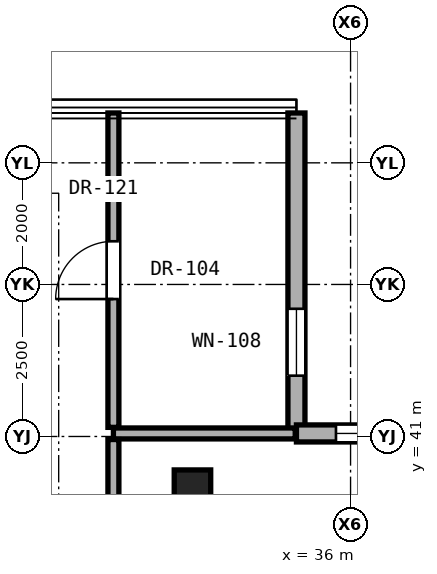
"""IFC4 building model, lengths in metres.
Left out: names, types, materials, properties, quantities, classifications, styles, units other than length and angle.
Written with IfcOpenShell. Run it as: python <this file> out.ifc"""

import sys

from ifc_helpers import new_model, si_unit, direction, frame, frame_2d, origin, origin_2d, place, context, subcontext, project, spatial, rectangle, extrude, element, fill, save


model = new_model("IFC4")
c1 = context("Model", 3, precision=1e-05, world=origin(), true_north=direction((0.0, 1.0)))
c2 = subcontext(c1, "Body", "Model", "MODEL_VIEW")
j1 = project(units=[si_unit("LENGTHUNIT", "METRE"), si_unit("PLANEANGLEUNIT", "RADIAN")], contexts=[c1])
p1 = place(None, origin())
s1 = spatial("IfcSite", under=j1, at=p1, CompositionType="ELEMENT")
p2 = place(p1, origin())
s2 = spatial("IfcBuilding", under=s1, at=p2, CompositionType="ELEMENT")
p3 = place(p2, frame((0.0, 0.0, 118.1)))
s3 = spatial("IfcBuildingStorey", under=s2, at=p3, CompositionType="ELEMENT", Elevation=118.1)
p4 = place(p3, frame((33.4, 40.0, 0.0), z_axis=(0.0, 0.0, 1.0), x_axis=(1.0, 0.0, 0.0)))
e1 = element("IfcColumn", 1, at=p4, inside=s3, PredefinedType="PILASTER", context=c2, shape_type="SweptSolid", body=[
    extrude(rectangle(XDim=0.6, YDim=0.9, at=origin_2d()), origin(), (0.0, 0.0, 1.0), 3.3),
])
p5 = place(p3, frame((35.11, 41.05, 0.0), z_axis=(0.0, 0.0, 1.0), x_axis=(0.0, 1.0, 0.0)))
e2 = element("IfcWall", 2, at=p5, inside=s3, PredefinedType="SOLIDWALL", context=c2, shape_type="SweptSolid", body=[
    extrude(rectangle(XDim=5.27, YDim=0.28, at=frame_2d((2.635, 0.0))), origin(), (0.0, 0.0, 1.0), 3.06),
])
p6 = place(p5, frame((0.95, 0.0, 0.85)))
e3 = element("IfcOpeningElement", 3, at=p6, cuts=e2, PredefinedType="OPENING", context=c2, shape_type="SweptSolid", body=[
    extrude(rectangle(XDim=1.1, YDim=2.0, at=frame_2d((0.55, 1.0))), frame((0.0, 0.15, 0.0), z_axis=(0.0, -1.0, 0.0), x_axis=(1.0, 0.0, 0.0)), (0.0, 0.0, 1.0), 0.3),
])
p7 = place(p3, frame((40.38, 41.05, 0.0), z_axis=(0.0, 0.0, 1.0), x_axis=(-1.0, 0.0, 0.0)))
e4 = element("IfcWall", 4, at=p7, inside=s3, PredefinedType="SOLIDWALL", context=c2, shape_type="SweptSolid", body=[
    extrude(rectangle(XDim=5.27, YDim=0.28, at=frame_2d((2.635, 0.0))), origin(), (0.0, 0.0, 1.0), 3.06),
])
p8 = place(p7, frame((3.52, 0.0, 0.85)))
e5 = element("IfcOpeningElement", 5, at=p8, cuts=e4, PredefinedType="OPENING", context=c2, shape_type="SweptSolid", body=[
    extrude(rectangle(XDim=1.1, YDim=2.0, at=frame_2d((0.55, 1.0))), frame((0.0, 0.15, 0.0), z_axis=(0.0, -1.0, 0.0), x_axis=(1.0, 0.0, 0.0)), (0.0, 0.0, 1.0), 0.3),
])
p9 = place(p3, frame((32.1, 41.05, 0.0), z_axis=(0.0, 0.0, 1.0), x_axis=(1.0, 0.0, 0.0)))
e6 = element("IfcWall", 6, at=p9, inside=s3, PredefinedType="PARTITIONING", context=c2, shape_type="SweptSolid", body=[
    extrude(rectangle(XDim=2.99, YDim=0.18, at=frame_2d((1.495, 0.0))), origin(), (0.0, 0.0, 1.0), 3.08),
])
p10 = place(p3, frame((32.1, 29.752, 0.0), z_axis=(0.0, 0.0, 1.0), x_axis=(0.0, 1.0, 0.0)))
e7 = element("IfcWall", 7, at=p10, inside=s3, PredefinedType="PARTITIONING", context=c2, shape_type="SweptSolid", body=[
    extrude(rectangle(XDim=11.198, YDim=0.18, at=frame_2d((5.599, 0.0))), origin(), (0.0, 0.0, 1.0), 2.299),
])
p11 = place(p10, frame((5.074, 0.0, 0.0)))
e8 = element("IfcOpeningElement", 8, at=p11, cuts=e7, PredefinedType="OPENING", context=c2, shape_type="SweptSolid", body=[
    extrude(rectangle(XDim=1.05, YDim=2.2, at=frame_2d((0.525, 1.1))), frame((0.0, 0.1, 0.0), z_axis=(0.0, -1.0, 0.0), x_axis=(1.0, 0.0, 0.0)), (0.0, 0.0, 1.0), 0.2),
])
p12 = place(p3, frame((32.1, 41.15, 0.0), z_axis=(0.0, 0.0, 1.0), x_axis=(0.0, 1.0, 0.0)))
e9 = element("IfcWall", 9, at=p12, inside=s3, PredefinedType="PARTITIONING", context=c2, shape_type="SweptSolid", body=[
    extrude(rectangle(XDim=5.17, YDim=0.18, at=frame_2d((2.585, 0.0))), origin(), (0.0, 0.0, 1.0), 3.08),
])
p13 = place(p12, frame((2.11, 0.0, 0.0)))
e10 = element("IfcOpeningElement", 10, at=p13, cuts=e9, PredefinedType="OPENING", context=c2, shape_type="SweptSolid", body=[
    extrude(rectangle(XDim=0.95, YDim=2.15, at=frame_2d((0.475, 1.075))), frame((0.0, 0.1, 0.0), z_axis=(0.0, -1.0, 0.0), x_axis=(1.0, 0.0, 0.0)), (0.0, 0.0, 1.0), 0.2),
])
p14 = place(p6, origin())
e11 = element("IfcWindow", 11, at=p14, inside=s3, PartitioningType="SINGLE_PANEL", PredefinedType="WINDOW", context=c2, shape_type="SweptSolid", body=[
    extrude(rectangle(XDim=1.1, YDim=2.0, at=frame_2d((0.55, 1.0))), frame((0.0, 0.03, 0.0), z_axis=(0.0, -1.0, 0.0), x_axis=(1.0, 0.0, 0.0)), (0.0, 0.0, 1.0), 0.06),
])
fill(e3, e11)
p15 = place(p8, origin())
e12 = element("IfcWindow", 12, at=p15, inside=s3, PartitioningType="SINGLE_PANEL", PredefinedType="WINDOW", context=c2, shape_type="SweptSolid", body=[
    extrude(rectangle(XDim=1.1, YDim=2.0, at=frame_2d((0.55, 1.0))), frame((0.0, 0.03, 0.0), z_axis=(0.0, -1.0, 0.0), x_axis=(1.0, 0.0, 0.0)), (0.0, 0.0, 1.0), 0.06),
])
fill(e5, e12)
p16 = place(p13, origin())
e13 = element("IfcDoor", 13, at=p16, inside=s3, OperationType="SINGLE_SWING_LEFT", PredefinedType="DOOR", context=c2, shape_type="SweptSolid", body=[
    extrude(rectangle(XDim=0.95, YDim=2.15, at=frame_2d((0.475, 1.075))), frame((0.0, 0.025, 0.0), z_axis=(0.0, -1.0, 0.0), x_axis=(1.0, 0.0, 0.0)), (0.0, 0.0, 1.0), 0.05),
])
fill(e10, e13)
save(model, sys.argv[1])
